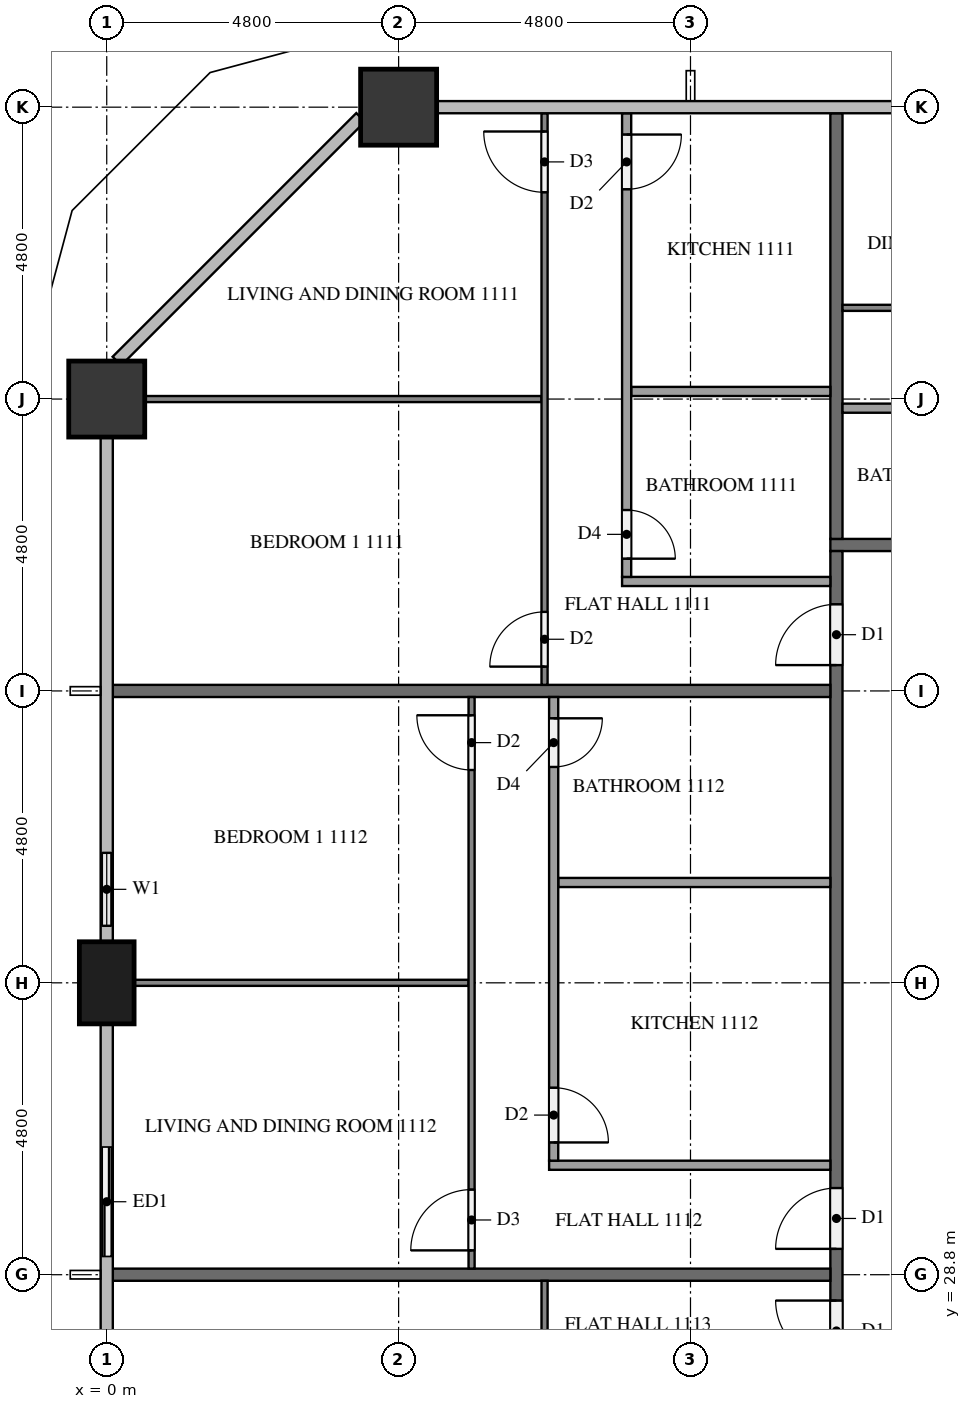
"""IFC4 building model, lengths in metres.
Left out: names, types, materials, properties, quantities, classifications, styles, units other than length and angle.
Written with IfcOpenShell. Run it as: python <this file> out.ifc"""

import sys

from ifc_helpers import new_model, si_unit, direction, frame, frame_2d, origin, origin_2d, place, context, subcontext, project, spatial, rectangle, extrude, element, fill, save


model = new_model("IFC4")
c1 = context("Model", 3, precision=1e-05, world=origin(), true_north=direction((0.0, 1.0)))
c2 = subcontext(c1, "Body", "Model", "MODEL_VIEW")
j1 = project(units=[si_unit("LENGTHUNIT", "METRE"), si_unit("PLANEANGLEUNIT", "RADIAN")], contexts=[c1])
p1 = place(None, origin())
s1 = spatial("IfcSite", under=j1, at=p1, CompositionType="ELEMENT")
p2 = place(p1, origin())
s2 = spatial("IfcBuilding", under=s1, at=p2, CompositionType="ELEMENT")
p3 = place(p2, frame((0.0, 0.0, 46.9)))
s3 = spatial("IfcBuildingStorey", under=s2, at=p3, CompositionType="ELEMENT", Elevation=46.9)
for number, where, z_axis, x_axis in (
    (1, (4.8, 48.0, 0.0), (0.0, 0.0, 1.0), (1.0, 0.0, 0.0)),
    (2, (0.0, 43.2, 0.0), (0.0, 0.0, 1.0), (1.0, 0.0, 0.0)),
):
    element("IfcColumn", number, at=place(p3, frame(where, z_axis=z_axis, x_axis=x_axis)), inside=s3, PredefinedType="COLUMN", context=c2, shape_type="SweptSolid", body=[
        extrude(rectangle(XDim=1.25, YDim=1.25, at=origin_2d()), origin(), (0.0, 0.0, 1.0), 3.2),
    ])
p4 = place(p3, frame((0.0, 33.6, 0.0), z_axis=(0.0, 0.0, 1.0), x_axis=(0.0, 1.0, 0.0)))
e3 = element("IfcColumn", 3, at=p4, inside=s3, PredefinedType="COLUMN", context=c2, shape_type="SweptSolid", body=[
    extrude(rectangle(XDim=1.35, YDim=0.9, at=origin_2d()), origin(), (0.0, 0.0, 1.0), 3.2),
])
p5 = place(p3, frame((0.0, 36.0, 0.0), z_axis=(0.0, 0.0, 1.0), x_axis=(0.0, -1.0, 0.0)))
e4 = element("IfcWall", 4, at=p5, inside=s3, PredefinedType="SOLIDWALL", context=c2, shape_type="SweptSolid", body=[
    extrude(rectangle(XDim=1.725, YDim=0.15, at=frame_2d((0.863, 0.0))), origin(), (0.0, 0.0, 1.0), 3.2),
])
p6 = place(p5, frame((0.262, 0.0, 0.9)))
e5 = element("IfcOpeningElement", 5, at=p6, cuts=e4, PredefinedType="OPENING", context=c2, shape_type="SweptSolid", body=[
    extrude(rectangle(XDim=1.2, YDim=1.4, at=frame_2d((0.6, 0.7))), frame((0.0, 0.085, 0.0), z_axis=(0.0, -1.0, 0.0), x_axis=(1.0, 0.0, 0.0)), (0.0, 0.0, 1.0), 0.17),
])
p7 = place(p3, frame((0.0, 31.2, 0.0), z_axis=(0.0, 0.0, 1.0), x_axis=(0.0, -1.0, 0.0)))
e6 = element("IfcWall", 6, at=p7, inside=s3, PredefinedType="SOLIDWALL", context=c2, shape_type="SweptSolid", body=[
    extrude(rectangle(XDim=2.4, YDim=0.15, at=frame_2d((1.2, 0.0))), origin(), (0.0, 0.0, 1.0), 3.2),
])
p8 = place(p7, frame((0.3, 0.0, 0.0)))
e7 = element("IfcOpeningElement", 7, at=p8, cuts=e6, PredefinedType="OPENING", context=c2, shape_type="SweptSolid", body=[
    extrude(rectangle(XDim=1.8, YDim=2.4, at=frame_2d((0.9, 1.2))), frame((0.0, 0.085, 0.0), z_axis=(0.0, -1.0, 0.0), x_axis=(1.0, 0.0, 0.0)), (0.0, 0.0, 1.0), 0.17),
])
p9 = place(p3, frame((11.9, 40.8, 0.0), z_axis=(0.0, 0.0, 1.0), x_axis=(1.0, 0.0, 0.0)))
e8 = element("IfcWall", 8, at=p9, inside=s3, PredefinedType="PARTITIONING", context=c2, shape_type="SweptSolid", body=[
    extrude(rectangle(XDim=38.6, YDim=0.2, at=frame_2d((19.3, 0.0))), origin(), (0.0, 0.0, 1.0), 3.2),
])
p10 = place(p9, frame((22.125, 0.0, 0.0)))
e9 = element("IfcOpeningElement", 9, at=p10, cuts=e8, PredefinedType="OPENING", context=c2, shape_type="SweptSolid", body=[
    extrude(rectangle(XDim=1.0, YDim=2.1, at=frame_2d((0.5, 1.05))), frame((0.0, 0.11, 0.0), z_axis=(0.0, -1.0, 0.0), x_axis=(1.0, 0.0, 0.0)), (0.0, 0.0, 1.0), 0.22),
])
p11 = place(p9, frame((10.125, 0.0, 0.0)))
e10 = element("IfcOpeningElement", 10, at=p11, cuts=e8, PredefinedType="OPENING", context=c2, shape_type="SweptSolid", body=[
    extrude(rectangle(XDim=1.0, YDim=2.1, at=frame_2d((0.5, 1.05))), frame((0.0, 0.11, 0.0), z_axis=(0.0, -1.0, 0.0), x_axis=(1.0, 0.0, 0.0)), (0.0, 0.0, 1.0), 0.22),
])
p12 = place(p9, frame((8.275, 0.0, 0.0)))
e11 = element("IfcOpeningElement", 11, at=p12, cuts=e8, PredefinedType="OPENING", context=c2, shape_type="SweptSolid", body=[
    extrude(rectangle(XDim=1.0, YDim=2.1, at=frame_2d((0.5, 1.05))), frame((0.0, 0.11, 0.0), z_axis=(0.0, -1.0, 0.0), x_axis=(1.0, 0.0, 0.0)), (0.0, 0.0, 1.0), 0.22),
])
p13 = place(p3, frame((12.0, 12.1, 0.0), z_axis=(0.0, 0.0, 1.0), x_axis=(0.0, 1.0, 0.0)))
e12 = element("IfcWall", 12, at=p13, inside=s3, PredefinedType="PARTITIONING", context=c2, shape_type="SweptSolid", body=[
    extrude(rectangle(XDim=28.6, YDim=0.2, at=frame_2d((14.3, 0.0))), origin(), (0.0, 0.0, 1.0), 3.2),
])
p14 = place(p13, frame((26.725, 0.0, 0.0)))
e13 = element("IfcOpeningElement", 13, at=p14, cuts=e12, PredefinedType="OPENING", context=c2, shape_type="SweptSolid", body=[
    extrude(rectangle(XDim=1.0, YDim=2.1, at=frame_2d((0.5, 1.05))), frame((0.0, 0.11, 0.0), z_axis=(0.0, -1.0, 0.0), x_axis=(1.0, 0.0, 0.0)), (0.0, 0.0, 1.0), 0.22),
])
p15 = place(p13, frame((17.125, 0.0, 0.0)))
e14 = element("IfcOpeningElement", 14, at=p15, cuts=e12, PredefinedType="OPENING", context=c2, shape_type="SweptSolid", body=[
    extrude(rectangle(XDim=1.0, YDim=2.1, at=frame_2d((0.5, 1.05))), frame((0.0, 0.11, 0.0), z_axis=(0.0, -1.0, 0.0), x_axis=(1.0, 0.0, 0.0)), (0.0, 0.0, 1.0), 0.22),
])
p16 = place(p13, frame((15.275, 0.0, 0.0)))
e15 = element("IfcOpeningElement", 15, at=p16, cuts=e12, PredefinedType="OPENING", context=c2, shape_type="SweptSolid", body=[
    extrude(rectangle(XDim=1.0, YDim=2.1, at=frame_2d((0.5, 1.05))), frame((0.0, 0.11, 0.0), z_axis=(0.0, -1.0, 0.0), x_axis=(1.0, 0.0, 0.0)), (0.0, 0.0, 1.0), 0.22),
])
p17 = place(p13, frame((5.675, 0.0, 0.0)))
e16 = element("IfcOpeningElement", 16, at=p17, cuts=e12, PredefinedType="OPENING", context=c2, shape_type="SweptSolid", body=[
    extrude(rectangle(XDim=1.0, YDim=2.1, at=frame_2d((0.5, 1.05))), frame((0.0, 0.11, 0.0), z_axis=(0.0, -1.0, 0.0), x_axis=(1.0, 0.0, 0.0)), (0.0, 0.0, 1.0), 0.22),
])
p18 = place(p3, frame((12.0, 47.9, 0.0), z_axis=(0.0, 0.0, 1.0), x_axis=(0.0, -1.0, 0.0)))
e17 = element("IfcWall", 17, at=p18, inside=s3, PredefinedType="PARTITIONING", context=c2, shape_type="SweptSolid", body=[
    extrude(rectangle(XDim=7.0, YDim=0.2, at=frame_2d((3.5, 0.0))), origin(), (0.0, 0.0, 1.0), 3.2),
])
for number, where, z_axis, x_axis in (
    (18, (0.1, 38.4, 0.0), (0.0, 0.0, 1.0), (1.0, 0.0, 0.0)),
    (19, (0.1, 28.8, 0.0), (0.0, 0.0, 1.0), (1.0, 0.0, 0.0)),
):
    element("IfcWall", number, at=place(p3, frame(where, z_axis=z_axis, x_axis=x_axis)), inside=s3, PredefinedType="PARTITIONING", context=c2, shape_type="SweptSolid", body=[
        extrude(rectangle(XDim=11.8, YDim=0.2, at=frame_2d((5.9, 0.0))), origin(), (0.0, 0.0, 1.0), 3.2),
    ])
p19 = place(p3, frame((12.1, 44.7, 0.0), z_axis=(0.0, 0.0, 1.0), x_axis=(1.0, 0.0, 0.0)))
e20 = element("IfcWall", 20, at=p19, inside=s3, PredefinedType="PARTITIONING", context=c2, shape_type="SweptSolid", body=[
    extrude(rectangle(XDim=9.4, YDim=0.1, at=frame_2d((4.7, 0.0))), origin(), (0.0, 0.0, 1.0), 3.2),
])
p20 = place(p19, frame((5.05, 0.0, 0.0)))
e21 = element("IfcOpeningElement", 21, at=p20, cuts=e20, PredefinedType="OPENING", context=c2, shape_type="SweptSolid", body=[
    extrude(rectangle(XDim=0.9, YDim=2.1, at=frame_2d((0.45, 1.05))), frame((0.0, 0.06, 0.0), z_axis=(0.0, -1.0, 0.0), x_axis=(1.0, 0.0, 0.0)), (0.0, 0.0, 1.0), 0.12),
])
p21 = place(p19, frame((3.35, 0.0, 0.0)))
e22 = element("IfcOpeningElement", 22, at=p21, cuts=e20, PredefinedType="OPENING", context=c2, shape_type="SweptSolid", body=[
    extrude(rectangle(XDim=1.0, YDim=2.1, at=frame_2d((0.5, 1.05))), frame((0.0, 0.06, 0.0), z_axis=(0.0, -1.0, 0.0), x_axis=(1.0, 0.0, 0.0)), (0.0, 0.0, 1.0), 0.12),
])
p22 = place(p3, frame((19.725, 43.05, 0.0), z_axis=(0.0, 0.0, 1.0), x_axis=(-1.0, 0.0, 0.0)))
e23 = element("IfcWall", 23, at=p22, inside=s3, PredefinedType="PARTITIONING", context=c2, shape_type="SweptSolid", body=[
    extrude(rectangle(XDim=7.625, YDim=0.15, at=frame_2d((3.812, 0.0))), origin(), (0.0, 0.0, 1.0), 3.2),
])
p23 = place(p22, frame((3.35, 0.0, 0.0)))
e24 = element("IfcOpeningElement", 24, at=p23, cuts=e23, PredefinedType="OPENING", context=c2, shape_type="SweptSolid", body=[
    extrude(rectangle(XDim=0.9, YDim=2.1, at=frame_2d((0.45, 1.05))), frame((0.0, 0.085, 0.0), z_axis=(0.0, -1.0, 0.0), x_axis=(1.0, 0.0, 0.0)), (0.0, 0.0, 1.0), 0.17),
])
p24 = place(p22, frame((4.9, 0.0, 0.0)))
e25 = element("IfcOpeningElement", 25, at=p24, cuts=e23, PredefinedType="OPENING", context=c2, shape_type="SweptSolid", body=[
    extrude(rectangle(XDim=0.8, YDim=2.1, at=frame_2d((0.4, 1.05))), frame((0.0, 0.085, 0.0), z_axis=(0.0, -1.0, 0.0), x_axis=(1.0, 0.0, 0.0)), (0.0, 0.0, 1.0), 0.17),
])
p25 = place(p3, frame((7.15, 43.2, 0.0), z_axis=(0.0, 0.0, 1.0), x_axis=(-1.0, 0.0, 0.0)))
e26 = element("IfcWall", 26, at=p25, inside=s3, PredefinedType="PARTITIONING", context=c2, shape_type="SweptSolid", body=[
    extrude(rectangle(XDim=6.525, YDim=0.1, at=frame_2d((3.262, 0.0))), origin(), (0.0, 0.0, 1.0), 3.2),
])
p26 = place(p3, frame((7.2, 38.5, 0.0), z_axis=(0.0, 0.0, 1.0), x_axis=(0.0, 1.0, 0.0)))
e27 = element("IfcWall", 27, at=p26, inside=s3, PredefinedType="PARTITIONING", context=c2, shape_type="SweptSolid", body=[
    extrude(rectangle(XDim=9.4, YDim=0.1, at=frame_2d((4.7, 0.0))), origin(), (0.0, 0.0, 1.0), 3.2),
])
p27 = place(p26, frame((0.3, 0.0, 0.0)))
e28 = element("IfcOpeningElement", 28, at=p27, cuts=e27, PredefinedType="OPENING", context=c2, shape_type="SweptSolid", body=[
    extrude(rectangle(XDim=0.9, YDim=2.1, at=frame_2d((0.45, 1.05))), frame((0.0, 0.06, 0.0), z_axis=(0.0, -1.0, 0.0), x_axis=(1.0, 0.0, 0.0)), (0.0, 0.0, 1.0), 0.12),
])
p28 = place(p26, frame((8.1, 0.0, 0.0)))
e29 = element("IfcOpeningElement", 29, at=p28, cuts=e27, PredefinedType="OPENING", context=c2, shape_type="SweptSolid", body=[
    extrude(rectangle(XDim=1.0, YDim=2.1, at=frame_2d((0.5, 1.05))), frame((0.0, 0.06, 0.0), z_axis=(0.0, -1.0, 0.0), x_axis=(1.0, 0.0, 0.0)), (0.0, 0.0, 1.0), 0.12),
])
p29 = place(p3, frame((11.9, 43.325, 0.0), z_axis=(0.0, 0.0, 1.0), x_axis=(-1.0, 0.0, 0.0)))
e30 = element("IfcWall", 30, at=p29, inside=s3, PredefinedType="PARTITIONING", context=c2, shape_type="SweptSolid", body=[
    extrude(rectangle(XDim=3.275, YDim=0.15, at=frame_2d((1.637, 0.0))), origin(), (0.0, 0.0, 1.0), 3.2),
])
p30 = place(p3, frame((11.9, 40.2, 0.0), z_axis=(0.0, 0.0, 1.0), x_axis=(-1.0, 0.0, 0.0)))
e31 = element("IfcWall", 31, at=p30, inside=s3, PredefinedType="PARTITIONING", context=c2, shape_type="SweptSolid", body=[
    extrude(rectangle(XDim=3.425, YDim=0.15, at=frame_2d((1.712, 0.0))), origin(), (0.0, 0.0, 1.0), 3.2),
])
p31 = place(p3, frame((8.55, 47.9, 0.0), z_axis=(0.0, 0.0, 1.0), x_axis=(0.0, -1.0, 0.0)))
e32 = element("IfcWall", 32, at=p31, inside=s3, PredefinedType="PARTITIONING", context=c2, shape_type="SweptSolid", body=[
    extrude(rectangle(XDim=7.625, YDim=0.15, at=frame_2d((3.812, 0.0))), origin(), (0.0, 0.0, 1.0), 3.2),
])
p32 = place(p31, frame((6.525, 0.0, 0.0)))
e33 = element("IfcOpeningElement", 33, at=p32, cuts=e32, PredefinedType="OPENING", context=c2, shape_type="SweptSolid", body=[
    extrude(rectangle(XDim=0.8, YDim=2.1, at=frame_2d((0.4, 1.05))), frame((0.0, 0.085, 0.0), z_axis=(0.0, -1.0, 0.0), x_axis=(1.0, 0.0, 0.0)), (0.0, 0.0, 1.0), 0.17),
])
p33 = place(p31, frame((0.35, 0.0, 0.0)))
e34 = element("IfcOpeningElement", 34, at=p33, cuts=e32, PredefinedType="OPENING", context=c2, shape_type="SweptSolid", body=[
    extrude(rectangle(XDim=0.9, YDim=2.1, at=frame_2d((0.45, 1.05))), frame((0.0, 0.085, 0.0), z_axis=(0.0, -1.0, 0.0), x_axis=(1.0, 0.0, 0.0)), (0.0, 0.0, 1.0), 0.17),
])
p34 = place(p3, frame((5.95, 33.6, 0.0), z_axis=(0.0, 0.0, 1.0), x_axis=(-1.0, 0.0, 0.0)))
e35 = element("IfcWall", 35, at=p34, inside=s3, PredefinedType="PARTITIONING", context=c2, shape_type="SweptSolid", body=[
    extrude(rectangle(XDim=5.5, YDim=0.1, at=frame_2d((2.75, 0.0))), origin(), (0.0, 0.0, 1.0), 3.2),
])
p35 = place(p3, frame((6.0, 28.9, 0.0), z_axis=(0.0, 0.0, 1.0), x_axis=(0.0, 1.0, 0.0)))
e36 = element("IfcWall", 36, at=p35, inside=s3, PredefinedType="PARTITIONING", context=c2, shape_type="SweptSolid", body=[
    extrude(rectangle(XDim=9.4, YDim=0.1, at=frame_2d((4.7, 0.0))), origin(), (0.0, 0.0, 1.0), 3.2),
])
p36 = place(p35, frame((0.3, 0.0, 0.0)))
e37 = element("IfcOpeningElement", 37, at=p36, cuts=e36, PredefinedType="OPENING", context=c2, shape_type="SweptSolid", body=[
    extrude(rectangle(XDim=1.0, YDim=2.1, at=frame_2d((0.5, 1.05))), frame((0.0, 0.06, 0.0), z_axis=(0.0, -1.0, 0.0), x_axis=(1.0, 0.0, 0.0)), (0.0, 0.0, 1.0), 0.12),
])
p37 = place(p35, frame((8.2, 0.0, 0.0)))
e38 = element("IfcOpeningElement", 38, at=p37, cuts=e36, PredefinedType="OPENING", context=c2, shape_type="SweptSolid", body=[
    extrude(rectangle(XDim=0.9, YDim=2.1, at=frame_2d((0.45, 1.05))), frame((0.0, 0.06, 0.0), z_axis=(0.0, -1.0, 0.0), x_axis=(1.0, 0.0, 0.0)), (0.0, 0.0, 1.0), 0.12),
])
p38 = place(p3, frame((11.9, 35.25, 0.0), z_axis=(0.0, 0.0, 1.0), x_axis=(-1.0, 0.0, 0.0)))
e39 = element("IfcWall", 39, at=p38, inside=s3, PredefinedType="PARTITIONING", context=c2, shape_type="SweptSolid", body=[
    extrude(rectangle(XDim=4.475, YDim=0.15, at=frame_2d((2.237, 0.0))), origin(), (0.0, 0.0, 1.0), 3.2),
])
p39 = place(p3, frame((11.9, 30.6, 0.0), z_axis=(0.0, 0.0, 1.0), x_axis=(-1.0, 0.0, 0.0)))
e40 = element("IfcWall", 40, at=p39, inside=s3, PredefinedType="PARTITIONING", context=c2, shape_type="SweptSolid", body=[
    extrude(rectangle(XDim=4.625, YDim=0.15, at=frame_2d((2.312, 0.0))), origin(), (0.0, 0.0, 1.0), 3.2),
])
p40 = place(p3, frame((7.35, 38.3, 0.0), z_axis=(0.0, 0.0, 1.0), x_axis=(0.0, -1.0, 0.0)))
e41 = element("IfcWall", 41, at=p40, inside=s3, PredefinedType="PARTITIONING", context=c2, shape_type="SweptSolid", body=[
    extrude(rectangle(XDim=7.625, YDim=0.15, at=frame_2d((3.812, 0.0))), origin(), (0.0, 0.0, 1.0), 3.2),
])
p41 = place(p40, frame((6.425, 0.0, 0.0)))
e42 = element("IfcOpeningElement", 42, at=p41, cuts=e41, PredefinedType="OPENING", context=c2, shape_type="SweptSolid", body=[
    extrude(rectangle(XDim=0.9, YDim=2.1, at=frame_2d((0.45, 1.05))), frame((0.0, 0.085, 0.0), z_axis=(0.0, -1.0, 0.0), x_axis=(1.0, 0.0, 0.0)), (0.0, 0.0, 1.0), 0.17),
])
p42 = place(p40, frame((0.35, 0.0, 0.0)))
e43 = element("IfcOpeningElement", 43, at=p42, cuts=e41, PredefinedType="OPENING", context=c2, shape_type="SweptSolid", body=[
    extrude(rectangle(XDim=0.8, YDim=2.1, at=frame_2d((0.4, 1.05))), frame((0.0, 0.085, 0.0), z_axis=(0.0, -1.0, 0.0), x_axis=(1.0, 0.0, 0.0)), (0.0, 0.0, 1.0), 0.17),
])
p43 = place(p3, frame((7.2, 19.3, 0.0), z_axis=(0.0, 0.0, 1.0), x_axis=(0.0, 1.0, 0.0)))
e44 = element("IfcWall", 44, at=p43, inside=s3, PredefinedType="PARTITIONING", context=c2, shape_type="SweptSolid", body=[
    extrude(rectangle(XDim=9.4, YDim=0.1, at=frame_2d((4.7, 0.0))), origin(), (0.0, 0.0, 1.0), 3.2),
])
p44 = place(p43, frame((5.05, 0.0, 0.0)))
e45 = element("IfcOpeningElement", 45, at=p44, cuts=e44, PredefinedType="OPENING", context=c2, shape_type="SweptSolid", body=[
    extrude(rectangle(XDim=1.0, YDim=2.1, at=frame_2d((0.5, 1.05))), frame((0.0, 0.06, 0.0), z_axis=(0.0, -1.0, 0.0), x_axis=(1.0, 0.0, 0.0)), (0.0, 0.0, 1.0), 0.12),
])
p45 = place(p43, frame((3.45, 0.0, 0.0)))
e46 = element("IfcOpeningElement", 46, at=p45, cuts=e44, PredefinedType="OPENING", context=c2, shape_type="SweptSolid", body=[
    extrude(rectangle(XDim=0.9, YDim=2.1, at=frame_2d((0.45, 1.05))), frame((0.0, 0.06, 0.0), z_axis=(0.0, -1.0, 0.0), x_axis=(1.0, 0.0, 0.0)), (0.0, 0.0, 1.0), 0.12),
])
p46 = place(p6, origin())
e47 = element("IfcWindow", 47, at=p46, inside=s3, PartitioningType="SINGLE_PANEL", PredefinedType="WINDOW", context=c2, shape_type="SweptSolid", body=[
    extrude(rectangle(XDim=1.2, YDim=1.4, at=frame_2d((0.6, 0.7))), frame((0.0, 0.03, 0.0), z_axis=(0.0, -1.0, 0.0), x_axis=(1.0, 0.0, 0.0)), (0.0, 0.0, 1.0), 0.06),
])
fill(e5, e47)
p47 = place(p8, origin())
e48 = element("IfcDoor", 48, at=p47, inside=s3, OperationType="SLIDING_TO_RIGHT", PredefinedType="DOOR", context=c2, shape_type="SweptSolid", body=[
    extrude(rectangle(XDim=1.8, YDim=2.4, at=frame_2d((0.9, 1.2))), frame((0.0, 0.025, 0.0), z_axis=(0.0, -1.0, 0.0), x_axis=(1.0, 0.0, 0.0)), (0.0, 0.0, 1.0), 0.05),
])
fill(e7, e48)
p48 = place(p14, origin())
e49 = element("IfcDoor", 49, at=p48, inside=s3, OperationType="SINGLE_SWING_LEFT", PredefinedType="DOOR", context=c2, shape_type="SweptSolid", body=[
    extrude(rectangle(XDim=1.0, YDim=2.1, at=frame_2d((0.5, 1.05))), frame((0.0, 0.025, 0.0), z_axis=(0.0, -1.0, 0.0), x_axis=(1.0, 0.0, 0.0)), (0.0, 0.0, 1.0), 0.05),
])
fill(e13, e49)
p49 = place(p15, origin())
e50 = element("IfcDoor", 50, at=p49, inside=s3, OperationType="SINGLE_SWING_LEFT", PredefinedType="DOOR", context=c2, shape_type="SweptSolid", body=[
    extrude(rectangle(XDim=1.0, YDim=2.1, at=frame_2d((0.5, 1.05))), frame((0.0, 0.025, 0.0), z_axis=(0.0, -1.0, 0.0), x_axis=(1.0, 0.0, 0.0)), (0.0, 0.0, 1.0), 0.05),
])
fill(e14, e50)
p50 = place(p16, origin())
e51 = element("IfcDoor", 51, at=p50, inside=s3, OperationType="SINGLE_SWING_RIGHT", PredefinedType="DOOR", context=c2, shape_type="SweptSolid", body=[
    extrude(rectangle(XDim=1.0, YDim=2.1, at=frame_2d((0.5, 1.05))), frame((0.0, 0.025, 0.0), z_axis=(0.0, -1.0, 0.0), x_axis=(1.0, 0.0, 0.0)), (0.0, 0.0, 1.0), 0.05),
])
fill(e15, e51)
p51 = place(p27, origin())
e52 = element("IfcDoor", 52, at=p51, inside=s3, OperationType="SINGLE_SWING_LEFT", PredefinedType="DOOR", context=c2, shape_type="SweptSolid", body=[
    extrude(rectangle(XDim=0.9, YDim=2.1, at=frame_2d((0.45, 1.05))), frame((0.0, 0.025, 0.0), z_axis=(0.0, -1.0, 0.0), x_axis=(1.0, 0.0, 0.0)), (0.0, 0.0, 1.0), 0.05),
])
fill(e28, e52)
p52 = place(p28, origin())
e53 = element("IfcDoor", 53, at=p52, inside=s3, OperationType="SINGLE_SWING_RIGHT", PredefinedType="DOOR", context=c2, shape_type="SweptSolid", body=[
    extrude(rectangle(XDim=1.0, YDim=2.1, at=frame_2d((0.5, 1.05))), frame((0.0, 0.025, 0.0), z_axis=(0.0, -1.0, 0.0), x_axis=(1.0, 0.0, 0.0)), (0.0, 0.0, 1.0), 0.05),
])
fill(e29, e53)
p53 = place(p32, origin())
e54 = element("IfcDoor", 54, at=p53, inside=s3, OperationType="SINGLE_SWING_RIGHT", PredefinedType="DOOR", context=c2, shape_type="SweptSolid", body=[
    extrude(rectangle(XDim=0.8, YDim=2.1, at=frame_2d((0.4, 1.05))), frame((0.0, 0.025, 0.0), z_axis=(0.0, -1.0, 0.0), x_axis=(1.0, 0.0, 0.0)), (0.0, 0.0, 1.0), 0.05),
])
fill(e33, e54)
p54 = place(p33, origin())
e55 = element("IfcDoor", 55, at=p54, inside=s3, OperationType="SINGLE_SWING_LEFT", PredefinedType="DOOR", context=c2, shape_type="SweptSolid", body=[
    extrude(rectangle(XDim=0.9, YDim=2.1, at=frame_2d((0.45, 1.05))), frame((0.0, 0.025, 0.0), z_axis=(0.0, -1.0, 0.0), x_axis=(1.0, 0.0, 0.0)), (0.0, 0.0, 1.0), 0.05),
])
fill(e34, e55)
p55 = place(p36, origin())
e56 = element("IfcDoor", 56, at=p55, inside=s3, OperationType="SINGLE_SWING_LEFT", PredefinedType="DOOR", context=c2, shape_type="SweptSolid", body=[
    extrude(rectangle(XDim=1.0, YDim=2.1, at=frame_2d((0.5, 1.05))), frame((0.0, 0.025, 0.0), z_axis=(0.0, -1.0, 0.0), x_axis=(1.0, 0.0, 0.0)), (0.0, 0.0, 1.0), 0.05),
])
fill(e37, e56)
p56 = place(p37, origin())
e57 = element("IfcDoor", 57, at=p56, inside=s3, OperationType="SINGLE_SWING_RIGHT", PredefinedType="DOOR", context=c2, shape_type="SweptSolid", body=[
    extrude(rectangle(XDim=0.9, YDim=2.1, at=frame_2d((0.45, 1.05))), frame((0.0, 0.025, 0.0), z_axis=(0.0, -1.0, 0.0), x_axis=(1.0, 0.0, 0.0)), (0.0, 0.0, 1.0), 0.05),
])
fill(e38, e57)
p57 = place(p41, origin())
e58 = element("IfcDoor", 58, at=p57, inside=s3, OperationType="SINGLE_SWING_RIGHT", PredefinedType="DOOR", context=c2, shape_type="SweptSolid", body=[
    extrude(rectangle(XDim=0.9, YDim=2.1, at=frame_2d((0.45, 1.05))), frame((0.0, 0.025, 0.0), z_axis=(0.0, -1.0, 0.0), x_axis=(1.0, 0.0, 0.0)), (0.0, 0.0, 1.0), 0.05),
])
fill(e42, e58)
p58 = place(p42, origin())
e59 = element("IfcDoor", 59, at=p58, inside=s3, OperationType="SINGLE_SWING_LEFT", PredefinedType="DOOR", context=c2, shape_type="SweptSolid", body=[
    extrude(rectangle(XDim=0.8, YDim=2.1, at=frame_2d((0.4, 1.05))), frame((0.0, 0.025, 0.0), z_axis=(0.0, -1.0, 0.0), x_axis=(1.0, 0.0, 0.0)), (0.0, 0.0, 1.0), 0.05),
])
fill(e43, e59)
save(model, sys.argv[1])
